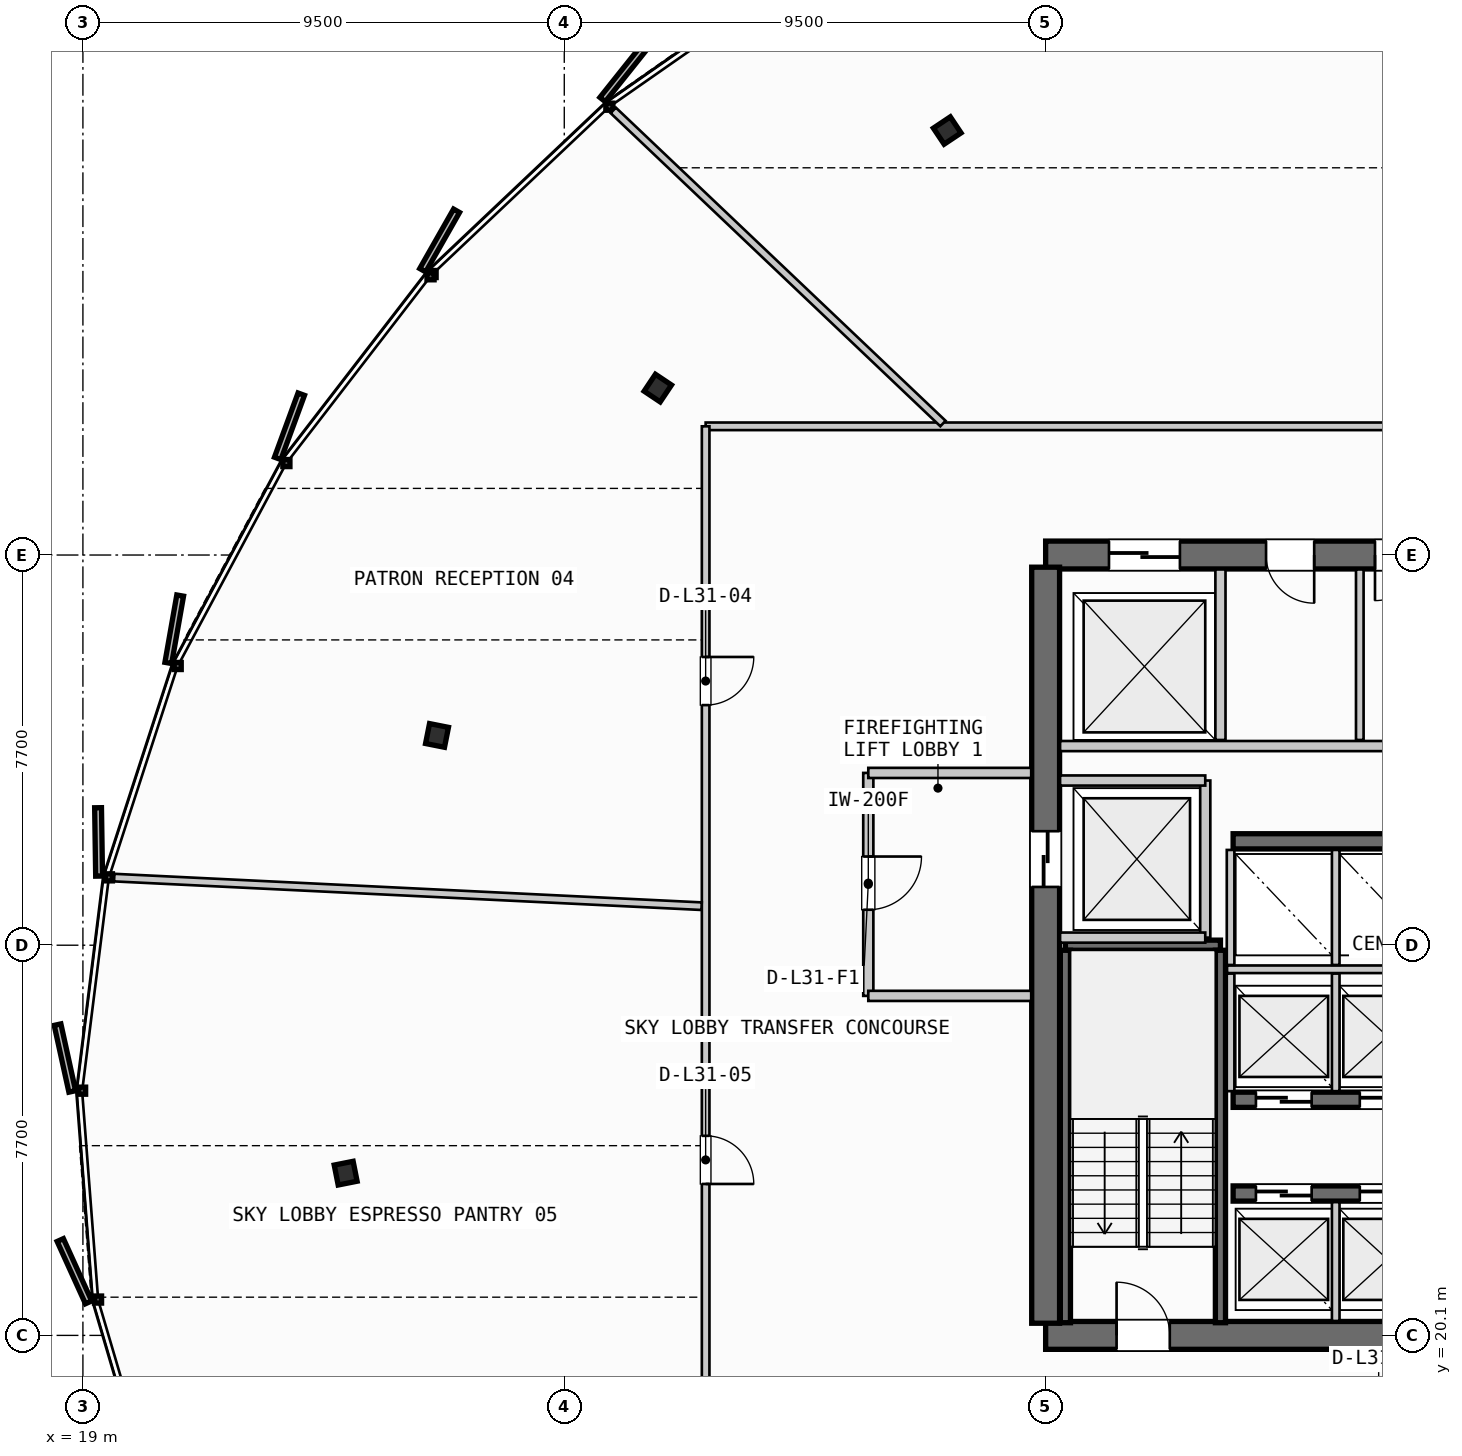
"""IFC4 building model, lengths in metres.
Left out: names, types, materials, properties, quantities, classifications, styles, units other than length and angle.
Written with IfcOpenShell. Run it as: python <this file> out.ifc"""

import sys

from ifc_helpers import new_model, si_unit, direction, frame, frame_2d, origin, origin_2d, place, context, subcontext, project, spatial, rectangle, i_section, extrude, source, transform, mapped, element, fill, save


model = new_model("IFC4")
c1 = context("Model", 3, precision=1e-05, world=origin(), true_north=direction((0.0, 1.0)))
c2 = subcontext(c1, "Body", "Model", "MODEL_VIEW")
j1 = project(units=[si_unit("LENGTHUNIT", "METRE"), si_unit("PLANEANGLEUNIT", "RADIAN")], contexts=[c1])
p1 = place(None, origin())
s1 = spatial("IfcSite", under=j1, at=p1, CompositionType="ELEMENT")
p2 = place(p1, origin())
s2 = spatial("IfcBuilding", under=s1, at=p2, CompositionType="ELEMENT")
p3 = place(p2, frame((0.0, 0.0, 125.2)))
s3 = spatial("IfcBuildingStorey", under=s2, at=p3, CompositionType="ELEMENT", Elevation=125.2)
p4 = place(p3, frame((38.0, 20.1, 0.0), z_axis=(0.0, 0.0, 1.0), x_axis=(1.0, 0.0, 0.0)))
e1 = element("IfcWall", 1, at=p4, inside=s3, PredefinedType="SHEAR", context=c2, shape_type="SweptSolid", body=[
    extrude(rectangle(XDim=17.6, YDim=0.55, at=frame_2d((8.8, 0.0))), origin(), (0.0, 0.0, 1.0), 3.35),
])
p5 = place(p4, frame((1.4, 0.0, 0.0)))
e2 = element("IfcOpeningElement", 2, at=p5, cuts=e1, PredefinedType="OPENING", context=c2, shape_type="SweptSolid", body=[
    extrude(rectangle(XDim=1.05, YDim=2.15, at=frame_2d((0.525, 1.075))), frame((0.0, 0.285, 0.0), z_axis=(0.0, -1.0, 0.0), x_axis=(1.0, 0.0, 0.0)), (0.0, 0.0, 1.0), 0.57),
])
p6 = place(p4, frame((15.15, 0.0, 0.0)))
e3 = element("IfcOpeningElement", 3, at=p6, cuts=e1, PredefinedType="OPENING", context=c2, shape_type="SweptSolid", body=[
    extrude(rectangle(XDim=1.05, YDim=2.15, at=frame_2d((0.525, 1.075))), frame((0.0, 0.285, 0.0), z_axis=(0.0, -1.0, 0.0), x_axis=(1.0, 0.0, 0.0)), (0.0, 0.0, 1.0), 0.57),
])
p7 = place(p3, frame((55.6, 35.5, 0.0), z_axis=(0.0, 0.0, 1.0), x_axis=(-1.0, 0.0, 0.0)))
e4 = element("IfcWall", 4, at=p7, inside=s3, PredefinedType="SHEAR", context=c2, shape_type="SweptSolid", body=[
    extrude(rectangle(XDim=17.6, YDim=0.55, at=frame_2d((8.8, 0.0))), origin(), (0.0, 0.0, 1.0), 3.35),
])
p8 = place(p7, frame((8.05, 0.0, 0.0)))
e5 = element("IfcOpeningElement", 5, at=p8, cuts=e4, PredefinedType="OPENING", context=c2, shape_type="SweptSolid", body=[
    extrude(rectangle(XDim=1.5, YDim=2.2, at=frame_2d((0.75, 1.1))), frame((0.0, 0.285, 0.0), z_axis=(0.0, -1.0, 0.0), x_axis=(1.0, 0.0, 0.0)), (0.0, 0.0, 1.0), 0.57),
])
p9 = place(p7, frame((14.95, 0.0, 0.0)))
e6 = element("IfcOpeningElement", 6, at=p9, cuts=e4, PredefinedType="OPENING", context=c2, shape_type="SweptSolid", body=[
    extrude(rectangle(XDim=1.4, YDim=2.3, at=frame_2d((0.7, 1.15))), frame((0.0, 0.285, 0.0), z_axis=(0.0, -1.0, 0.0), x_axis=(1.0, 0.0, 0.0)), (0.0, 0.0, 1.0), 0.57),
])
p10 = place(p7, frame((12.3, 0.0, 0.0)))
e7 = element("IfcOpeningElement", 7, at=p10, cuts=e4, PredefinedType="OPENING", context=c2, shape_type="SweptSolid", body=[
    extrude(rectangle(XDim=0.95, YDim=2.15, at=frame_2d((0.475, 1.075))), frame((0.0, 0.285, 0.0), z_axis=(0.0, -1.0, 0.0), x_axis=(1.0, 0.0, 0.0)), (0.0, 0.0, 1.0), 0.57),
])
p11 = place(p7, frame((10.2, 0.0, 0.0)))
e8 = element("IfcOpeningElement", 8, at=p11, cuts=e4, PredefinedType="OPENING", context=c2, shape_type="SweptSolid", body=[
    extrude(rectangle(XDim=0.9, YDim=2.15, at=frame_2d((0.45, 1.075))), frame((0.0, 0.285, 0.0), z_axis=(0.0, -1.0, 0.0), x_axis=(1.0, 0.0, 0.0)), (0.0, 0.0, 1.0), 0.57),
])
p12 = place(p3, frame((38.0, 35.26, 0.0), z_axis=(0.0, 0.0, 1.0), x_axis=(0.0, -1.0, 0.0)))
e9 = element("IfcWall", 9, at=p12, inside=s3, PredefinedType="SHEAR", context=c2, shape_type="SweptSolid", body=[
    extrude(rectangle(XDim=14.92, YDim=0.55, at=frame_2d((7.46, 0.0))), origin(), (0.0, 0.0, 1.0), 3.35),
])
p13 = place(p12, frame((5.21, 0.0, 0.0)))
e10 = element("IfcOpeningElement", 10, at=p13, cuts=e9, PredefinedType="OPENING", context=c2, shape_type="SweptSolid", body=[
    extrude(rectangle(XDim=1.1, YDim=2.2, at=frame_2d((0.55, 1.1))), frame((0.0, 0.285, 0.0), z_axis=(0.0, -1.0, 0.0), x_axis=(1.0, 0.0, 0.0)), (0.0, 0.0, 1.0), 0.57),
])
p14 = place(p3, frame((41.7, 22.9, 0.0), z_axis=(0.0, 0.0, 1.0), x_axis=(1.0, 0.0, 0.0)))
e11 = element("IfcWall", 11, at=p14, inside=s3, PredefinedType="SHEAR", context=c2, shape_type="SweptSolid", body=[
    extrude(rectangle(XDim=4.25, YDim=0.3, at=frame_2d((2.125, 0.0))), origin(), (0.0, 0.0, 1.0), 3.35),
])
p15 = place(p14, frame((0.45, 0.0, 0.0)))
e12 = element("IfcOpeningElement", 12, at=p15, cuts=e11, PredefinedType="OPENING", context=c2, shape_type="SweptSolid", body=[
    extrude(rectangle(XDim=1.1, YDim=2.2, at=frame_2d((0.55, 1.1))), frame((0.0, 0.16, 0.0), z_axis=(0.0, -1.0, 0.0), x_axis=(1.0, 0.0, 0.0)), (0.0, 0.0, 1.0), 0.32),
])
p16 = place(p14, frame((2.5, 0.0, 0.0)))
e13 = element("IfcOpeningElement", 13, at=p16, cuts=e11, PredefinedType="OPENING", context=c2, shape_type="SweptSolid", body=[
    extrude(rectangle(XDim=1.1, YDim=2.2, at=frame_2d((0.55, 1.1))), frame((0.0, 0.16, 0.0), z_axis=(0.0, -1.0, 0.0), x_axis=(1.0, 0.0, 0.0)), (0.0, 0.0, 1.0), 0.32),
])
p17 = place(p3, frame((41.7, 24.75, 0.0), z_axis=(0.0, 0.0, 1.0), x_axis=(1.0, 0.0, 0.0)))
e14 = element("IfcWall", 14, at=p17, inside=s3, PredefinedType="SHEAR", context=c2, shape_type="SweptSolid", body=[
    extrude(rectangle(XDim=4.25, YDim=0.3, at=frame_2d((2.125, 0.0))), origin(), (0.0, 0.0, 1.0), 3.35),
])
p18 = place(p17, frame((0.45, 0.0, 0.0)))
e15 = element("IfcOpeningElement", 15, at=p18, cuts=e14, PredefinedType="OPENING", context=c2, shape_type="SweptSolid", body=[
    extrude(rectangle(XDim=1.1, YDim=2.2, at=frame_2d((0.55, 1.1))), frame((0.0, 0.16, 0.0), z_axis=(0.0, -1.0, 0.0), x_axis=(1.0, 0.0, 0.0)), (0.0, 0.0, 1.0), 0.32),
])
p19 = place(p17, frame((2.5, 0.0, 0.0)))
e16 = element("IfcOpeningElement", 16, at=p19, cuts=e14, PredefinedType="OPENING", context=c2, shape_type="SweptSolid", body=[
    extrude(rectangle(XDim=1.1, YDim=2.2, at=frame_2d((0.55, 1.1))), frame((0.0, 0.16, 0.0), z_axis=(0.0, -1.0, 0.0), x_axis=(1.0, 0.0, 0.0)), (0.0, 0.0, 1.0), 0.32),
])
p20 = place(p3, frame((41.7, 29.85, 0.0), z_axis=(0.0, 0.0, 1.0), x_axis=(1.0, 0.0, 0.0)))
e17 = element("IfcWall", 17, at=p20, inside=s3, PredefinedType="SHEAR", context=c2, shape_type="SweptSolid", body=[
    extrude(rectangle(XDim=4.25, YDim=0.3, at=frame_2d((2.125, 0.0))), origin(), (0.0, 0.0, 1.0), 3.35),
])
m1 = source(origin(), c2, "Body", "SweptSolid", [
    extrude(i_section(OverallWidth=0.401, OverallDepth=0.381, WebThickness=0.032, FlangeThickness=0.051, FilletRadius=0.015, at=origin_2d()), origin(), (0.0, 0.0, 1.0), 3.35),
])
for number, where, z_axis, x_axis in (
    (18, (36.058, 43.877, 0.0), (0.0, 0.0, 1.0), (-0.556, 0.831, 0.0)),
    (19, (30.346, 38.794, 0.0), (0.0, 0.0, 1.0), (-0.831, 0.556, 0.0)),
    (20, (25.989, 31.94, 0.0), (0.0, 0.0, 1.0), (-0.981, 0.195, 0.0)),
    (21, (24.185, 23.302, 0.0), (0.0, 0.0, 1.0), (-0.981, -0.195, 0.0)),
):
    element("IfcColumn", number, at=place(p3, frame(where, z_axis=z_axis, x_axis=x_axis)), inside=s3, PredefinedType="COLUMN", context=c2, shape_type="MappedRepresentation", body=[
        mapped(m1, transform((0.0, 0.0, 0.0), scale=1.0)),
    ])
p21 = place(p3, frame((38.39, 27.8, 0.0), z_axis=(0.0, 0.0, 1.0), x_axis=(1.0, 0.0, 0.0)))
e22 = element("IfcWall", 22, at=p21, inside=s3, PredefinedType="SHEAR", context=c2, shape_type="SweptSolid", body=[
    extrude(rectangle(XDim=3.06, YDim=0.2, at=frame_2d((1.53, 0.0))), origin(), (0.0, 0.0, 1.0), 3.35),
])
for number, where, z_axis, x_axis in (
    (23, (41.45, 27.7, 0.0), (0.0, 0.0, 1.0), (0.0, -1.0, 0.0)),
    (24, (38.39, 20.35, 0.0), (0.0, 0.0, 1.0), (0.0, 1.0, 0.0)),
):
    element("IfcWall", number, at=place(p3, frame(where, z_axis=z_axis, x_axis=x_axis)), inside=s3, PredefinedType="SHEAR", context=c2, shape_type="SweptSolid", body=[
        extrude(rectangle(XDim=7.35, YDim=0.2, at=frame_2d((3.675, 0.0))), origin(), (0.0, 0.0, 1.0), 3.35),
    ])
p22 = place(p3, frame((41.15, 27.95, 0.0), z_axis=(0.0, 0.0, 1.0), x_axis=(0.0, 1.0, 0.0)))
e25 = element("IfcWall", 25, at=p22, inside=s3, PredefinedType="PARTITIONING", context=c2, shape_type="SweptSolid", body=[
    extrude(rectangle(XDim=3.1, YDim=0.2, at=frame_2d((1.55, 0.0))), origin(), (0.0, 0.0, 1.0), 2.635),
])
for number, where, z_axis, x_axis in (
    (26, (38.285, 27.95, 0.0), (0.0, 0.0, 1.0), (1.0, 0.0, 0.0)),
    (27, (38.285, 31.05, 0.0), (0.0, 0.0, 1.0), (1.0, 0.0, 0.0)),
):
    element("IfcWall", number, at=place(p3, frame(where, z_axis=z_axis, x_axis=x_axis)), inside=s3, PredefinedType="PARTITIONING", context=c2, shape_type="SweptSolid", body=[
        extrude(rectangle(XDim=2.865, YDim=0.2, at=frame_2d((1.433, 0.0))), origin(), (0.0, 0.0, 1.0), 2.635),
    ])
p23 = place(p3, frame((34.5, 31.2, 0.0), z_axis=(0.0, 0.0, 1.0), x_axis=(0.0, -1.0, 0.0)))
e28 = element("IfcWall", 28, at=p23, inside=s3, PredefinedType="PARTITIONING", context=c2, shape_type="SweptSolid", body=[
    extrude(rectangle(XDim=4.4, YDim=0.2, at=frame_2d((2.2, 0.0))), origin(), (0.0, 0.0, 1.0), 2.635),
])
p24 = place(p23, frame((1.65, 0.0, 0.0)))
e29 = element("IfcOpeningElement", 29, at=p24, cuts=e28, PredefinedType="OPENING", context=c2, shape_type="SweptSolid", body=[
    extrude(rectangle(XDim=1.05, YDim=2.15, at=frame_2d((0.525, 1.075))), frame((0.0, 0.11, 0.0), z_axis=(0.0, -1.0, 0.0), x_axis=(1.0, 0.0, 0.0)), (0.0, 0.0, 1.0), 0.22),
])
for number, where, z_axis, x_axis in (
    (30, (34.5, 26.8, 0.0), (0.0, 0.0, 1.0), (1.0, 0.0, 0.0)),
    (31, (34.5, 31.2, 0.0), (0.0, 0.0, 1.0), (1.0, 0.0, 0.0)),
):
    element("IfcWall", number, at=place(p3, frame(where, z_axis=z_axis, x_axis=x_axis)), inside=s3, PredefinedType="PARTITIONING", context=c2, shape_type="SweptSolid", body=[
        extrude(rectangle(XDim=3.215, YDim=0.2, at=frame_2d((1.607, 0.0))), origin(), (0.0, 0.0, 1.0), 2.635),
    ])
p25 = place(p3, frame((43.725, 20.385, 0.0), z_axis=(0.0, 0.0, 1.0), x_axis=(0.0, 1.0, 0.0)))
e32 = element("IfcWall", 32, at=p25, inside=s3, PredefinedType="PARTITIONING", context=c2, shape_type="SweptSolid", body=[
    extrude(rectangle(XDim=2.345, YDim=0.15, at=frame_2d((1.172, 0.0))), origin(), (0.0, 0.0, 1.0), 2.635),
])
p26 = place(p3, frame((41.58, 27.325, 0.0), z_axis=(0.0, 0.0, 1.0), x_axis=(1.0, 0.0, 0.0)))
e33 = element("IfcWall", 33, at=p26, inside=s3, PredefinedType="PARTITIONING", context=c2, shape_type="SweptSolid", body=[
    extrude(rectangle(XDim=4.32, YDim=0.15, at=frame_2d((2.16, 0.0))), origin(), (0.0, 0.0, 1.0), 2.635),
])
for number, where, z_axis, x_axis in (
    (34, (41.65, 24.92, 0.0), (0.0, 0.0, 1.0), (0.0, 1.0, 0.0)),
    (35, (43.725, 24.92, 0.0), (0.0, 0.0, 1.0), (0.0, 1.0, 0.0)),
):
    element("IfcWall", number, at=place(p3, frame(where, z_axis=z_axis, x_axis=x_axis)), inside=s3, PredefinedType="PARTITIONING", context=c2, shape_type="SweptSolid", body=[
        extrude(rectangle(XDim=2.32, YDim=0.15, at=frame_2d((1.16, 0.0))), origin(), (0.0, 0.0, 1.0), 2.635),
    ])
for number, where, z_axis, x_axis in (
    (36, (41.65, 27.41, 0.0), (0.0, 0.0, 1.0), (0.0, 1.0, 0.0)),
    (37, (43.725, 27.41, 0.0), (0.0, 0.0, 1.0), (0.0, 1.0, 0.0)),
):
    element("IfcWall", number, at=place(p3, frame(where, z_axis=z_axis, x_axis=x_axis)), inside=s3, PredefinedType="PARTITIONING", context=c2, shape_type="SweptSolid", body=[
        extrude(rectangle(XDim=2.27, YDim=0.15, at=frame_2d((1.135, 0.0))), origin(), (0.0, 0.0, 1.0), 2.635),
    ])
p27 = place(p3, frame((41.45, 31.85, 0.0), z_axis=(0.0, 0.0, 1.0), x_axis=(0.0, 1.0, 0.0)))
e38 = element("IfcWall", 38, at=p27, inside=s3, PredefinedType="PARTITIONING", context=c2, shape_type="SweptSolid", body=[
    extrude(rectangle(XDim=3.365, YDim=0.2, at=frame_2d((1.683, 0.0))), origin(), (0.0, 0.0, 1.0), 2.635),
])
p28 = place(p3, frame((38.285, 31.73, 0.0), z_axis=(0.0, 0.0, 1.0), x_axis=(1.0, 0.0, 0.0)))
e39 = element("IfcWall", 39, at=p28, inside=s3, PredefinedType="PARTITIONING", context=c2, shape_type="SweptSolid", body=[
    extrude(rectangle(XDim=7.515, YDim=0.2, at=frame_2d((3.758, 0.0))), origin(), (0.0, 0.0, 1.0), 2.635),
])
p29 = place(p3, frame((44.2, 31.85, 0.0), z_axis=(0.0, 0.0, 1.0), x_axis=(0.0, 1.0, 0.0)))
e40 = element("IfcWall", 40, at=p29, inside=s3, PredefinedType="PLUMBINGWALL", context=c2, shape_type="SweptSolid", body=[
    extrude(rectangle(XDim=3.365, YDim=0.15, at=frame_2d((1.683, 0.0))), origin(), (0.0, 0.0, 1.0), 2.635),
])
p30 = place(p3, frame((60.75, 38.04, 0.0), z_axis=(0.0, 0.0, 1.0), x_axis=(-1.0, 0.0, 0.0)))
e41 = element("IfcWall", 41, at=p30, inside=s3, PredefinedType="PARTITIONING", context=c2, shape_type="SweptSolid", body=[
    extrude(rectangle(XDim=29.46, YDim=0.15, at=frame_2d((14.73, 0.0))), origin(), (0.0, 0.0, 1.0), 2.635),
])
p31 = place(p30, frame((12.498, 0.0, 0.0)))
e42 = element("IfcOpeningElement", 42, at=p31, cuts=e41, PredefinedType="OPENING", context=c2, shape_type="SweptSolid", body=[
    extrude(rectangle(XDim=0.95, YDim=2.15, at=frame_2d((0.475, 1.075))), frame((0.0, 0.085, 0.0), z_axis=(0.0, -1.0, 0.0), x_axis=(1.0, 0.0, 0.0)), (0.0, 0.0, 1.0), 0.17),
])
p32 = place(p3, frame((31.29, 38.04, 0.0), z_axis=(0.0, 0.0, 1.0), x_axis=(0.0, -1.0, 0.0)))
e43 = element("IfcWall", 43, at=p32, inside=s3, PredefinedType="PARTITIONING", context=c2, shape_type="SweptSolid", body=[
    extrude(rectangle(XDim=20.06, YDim=0.15, at=frame_2d((10.03, 0.0))), origin(), (0.0, 0.0, 1.0), 2.635),
])
p33 = place(p32, frame((4.552, 0.0, 0.0)))
e44 = element("IfcOpeningElement", 44, at=p33, cuts=e43, PredefinedType="OPENING", context=c2, shape_type="SweptSolid", body=[
    extrude(rectangle(XDim=0.95, YDim=2.15, at=frame_2d((0.475, 1.075))), frame((0.0, 0.085, 0.0), z_axis=(0.0, -1.0, 0.0), x_axis=(1.0, 0.0, 0.0)), (0.0, 0.0, 1.0), 0.17),
])
p34 = place(p32, frame((14.002, 0.0, 0.0)))
e45 = element("IfcOpeningElement", 45, at=p34, cuts=e43, PredefinedType="OPENING", context=c2, shape_type="SweptSolid", body=[
    extrude(rectangle(XDim=0.95, YDim=2.15, at=frame_2d((0.475, 1.075))), frame((0.0, 0.085, 0.0), z_axis=(0.0, -1.0, 0.0), x_axis=(1.0, 0.0, 0.0)), (0.0, 0.0, 1.0), 0.17),
])
p35 = place(p3, frame((35.974, 38.095, 0.0), z_axis=(0.0, 0.0, 1.0), x_axis=(-0.725125759057, 0.688616463317, 0.0)))
e46 = element("IfcWall", 46, at=p35, inside=s3, PredefinedType="PARTITIONING", context=c2, shape_type="SweptSolid", body=[
    extrude(rectangle(XDim=8.974, YDim=0.15, at=frame_2d((4.487, 0.0))), origin(), (0.0, 0.0, 1.0), 2.635),
])
p36 = place(p3, frame((31.21, 28.57, 0.0), z_axis=(0.0, 0.0, 1.0), x_axis=(-0.998817663402, 0.048613529761, 0.0)))
e47 = element("IfcWall", 47, at=p36, inside=s3, PredefinedType="PARTITIONING", context=c2, shape_type="SweptSolid", body=[
    extrude(rectangle(XDim=11.606, YDim=0.15, at=frame_2d((5.803, 0.0))), origin(), (0.0, 0.0, 1.0), 2.635),
])
m2 = source(origin(), c2, "Body", "SweptSolid", [
    extrude(rectangle(XDim=1.05, YDim=2.15, at=frame_2d((0.525, 1.075))), frame((0.0, 0.025, 0.0), z_axis=(0.0, -1.0, 0.0), x_axis=(1.0, 0.0, 0.0)), (0.0, 0.0, 1.0), 0.05),
])
p37 = place(p5, origin())
e48 = element("IfcDoor", 48, at=p37, inside=s3, OperationType="SINGLE_SWING_LEFT", PredefinedType="DOOR", context=c2, shape_type="MappedRepresentation", body=[
    mapped(m2, transform((0.0, 0.0, 0.0), scale=1.0)),
])
fill(e2, e48)
m3 = source(origin(), c2, "Body", "SweptSolid", [
    extrude(rectangle(XDim=1.1, YDim=2.2, at=frame_2d((0.55, 1.1))), frame((0.0, 0.025, 0.0), z_axis=(0.0, -1.0, 0.0), x_axis=(1.0, 0.0, 0.0)), (0.0, 0.0, 1.0), 0.05),
])
p38 = place(p13, origin())
e49 = element("IfcDoor", 49, at=p38, inside=s3, OperationType="SLIDING_TO_LEFT", PredefinedType="DOOR", context=c2, shape_type="MappedRepresentation", body=[
    mapped(m3, transform((0.0, 0.0, 0.0), scale=1.0)),
])
fill(e10, e49)
p39 = place(p15, origin())
e50 = element("IfcDoor", 50, at=p39, inside=s3, OperationType="SLIDING_TO_LEFT", PredefinedType="DOOR", context=c2, shape_type="MappedRepresentation", body=[
    mapped(m3, transform((0.0, 0.0, 0.0), scale=1.0)),
])
fill(e12, e50)
p40 = place(p16, origin())
e51 = element("IfcDoor", 51, at=p40, inside=s3, OperationType="SLIDING_TO_LEFT", PredefinedType="DOOR", context=c2, shape_type="MappedRepresentation", body=[
    mapped(m3, transform((0.0, 0.0, 0.0), scale=1.0)),
])
fill(e13, e51)
p41 = place(p18, origin())
e52 = element("IfcDoor", 52, at=p41, inside=s3, OperationType="SLIDING_TO_RIGHT", PredefinedType="DOOR", context=c2, shape_type="MappedRepresentation", body=[
    mapped(m3, transform((0.0, 0.0, 0.0), scale=1.0)),
])
fill(e15, e52)
p42 = place(p19, origin())
e53 = element("IfcDoor", 53, at=p42, inside=s3, OperationType="SLIDING_TO_RIGHT", PredefinedType="DOOR", context=c2, shape_type="MappedRepresentation", body=[
    mapped(m3, transform((0.0, 0.0, 0.0), scale=1.0)),
])
fill(e16, e53)
m4 = source(origin(), c2, "Body", "SweptSolid", [
    extrude(rectangle(XDim=1.4, YDim=2.3, at=frame_2d((0.7, 1.15))), frame((0.0, 0.025, 0.0), z_axis=(0.0, -1.0, 0.0), x_axis=(1.0, 0.0, 0.0)), (0.0, 0.0, 1.0), 0.05),
])
p43 = place(p9, origin())
e54 = element("IfcDoor", 54, at=p43, inside=s3, OperationType="SLIDING_TO_RIGHT", PredefinedType="DOOR", context=c2, shape_type="MappedRepresentation", body=[
    mapped(m4, transform((0.0, 0.0, 0.0), scale=1.0)),
])
fill(e6, e54)
m5 = source(origin(), c2, "Body", "SweptSolid", [
    extrude(rectangle(XDim=0.95, YDim=2.15, at=frame_2d((0.475, 1.075))), frame((0.0, 0.025, 0.0), z_axis=(0.0, -1.0, 0.0), x_axis=(1.0, 0.0, 0.0)), (0.0, 0.0, 1.0), 0.05),
])
p44 = place(p10, origin())
e55 = element("IfcDoor", 55, at=p44, inside=s3, OperationType="SINGLE_SWING_LEFT", PredefinedType="DOOR", context=c2, shape_type="MappedRepresentation", body=[
    mapped(m5, transform((0.0, 0.0, 0.0), scale=1.0)),
])
fill(e7, e55)
m6 = source(origin(), c2, "Body", "SweptSolid", [
    extrude(rectangle(XDim=0.9, YDim=2.15, at=frame_2d((0.45, 1.075))), frame((0.0, 0.025, 0.0), z_axis=(0.0, -1.0, 0.0), x_axis=(1.0, 0.0, 0.0)), (0.0, 0.0, 1.0), 0.05),
])
p45 = place(p11, origin())
e56 = element("IfcDoor", 56, at=p45, inside=s3, OperationType="SINGLE_SWING_RIGHT", PredefinedType="DOOR", context=c2, shape_type="MappedRepresentation", body=[
    mapped(m6, transform((0.0, 0.0, 0.0), scale=1.0)),
])
fill(e8, e56)
p46 = place(p24, origin())
e57 = element("IfcDoor", 57, at=p46, inside=s3, OperationType="SINGLE_SWING_LEFT", PredefinedType="DOOR", context=c2, shape_type="MappedRepresentation", body=[
    mapped(m2, transform((0.0, 0.0, 0.0), scale=1.0)),
])
fill(e29, e57)
p47 = place(p33, origin())
e58 = element("IfcDoor", 58, at=p47, inside=s3, OperationType="SINGLE_SWING_LEFT", PredefinedType="DOOR", context=c2, shape_type="MappedRepresentation", body=[
    mapped(m5, transform((0.0, 0.0, 0.0), scale=1.0)),
])
fill(e44, e58)
p48 = place(p34, origin())
e59 = element("IfcDoor", 59, at=p48, inside=s3, OperationType="SINGLE_SWING_RIGHT", PredefinedType="DOOR", context=c2, shape_type="MappedRepresentation", body=[
    mapped(m5, transform((0.0, 0.0, 0.0), scale=1.0)),
])
fill(e45, e59)
save(model, sys.argv[1])
